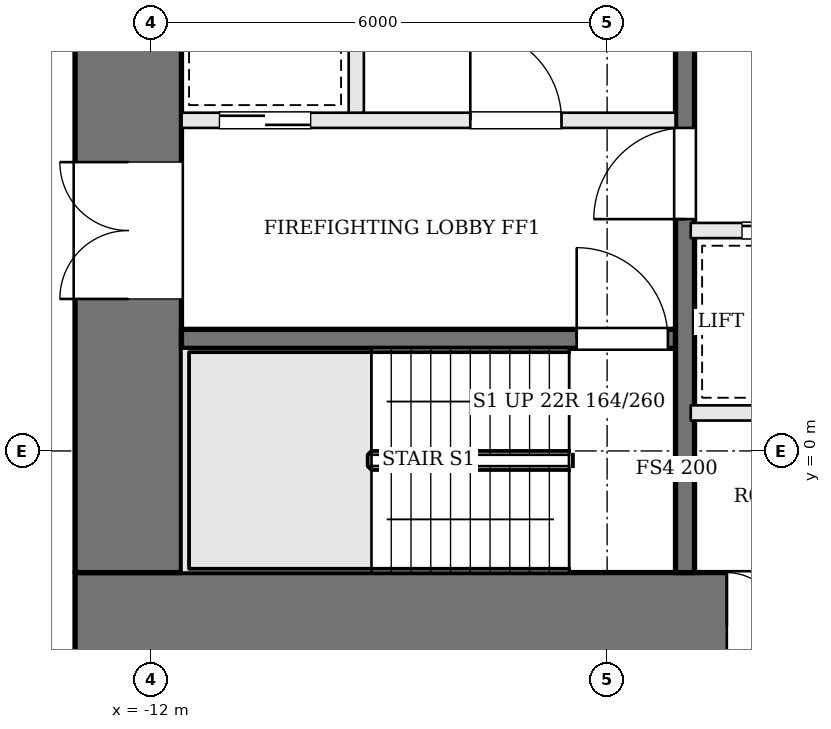
"""IFC4 building model, lengths in metres.
Left out: names, types, materials, properties, quantities, classifications, styles, units other than length and angle.
Written with IfcOpenShell. Run it as: python <this file> out.ifc"""

import sys

from ifc_helpers import new_model, si_unit, direction, frame, frame_2d, origin, place, context, subcontext, project, spatial, rectangle, extrude, element, fill, save


model = new_model("IFC4")
c1 = context("Model", 3, precision=1e-05, world=origin(), true_north=direction((0.0, 1.0)))
c2 = subcontext(c1, "Body", "Model", "MODEL_VIEW")
j1 = project(units=[si_unit("LENGTHUNIT", "METRE"), si_unit("PLANEANGLEUNIT", "RADIAN")], contexts=[c1])
p1 = place(None, origin())
s1 = spatial("IfcSite", under=j1, at=p1, CompositionType="ELEMENT")
p2 = place(p1, origin())
s2 = spatial("IfcBuilding", under=s1, at=p2, CompositionType="ELEMENT")
p3 = place(p2, frame((0.0, 0.0, 51.9)))
s3 = spatial("IfcBuildingStorey", under=s2, at=p3, CompositionType="ELEMENT", Elevation=51.9)
p4 = place(p3, frame((-13.0, -2.3, 0.0), z_axis=(0.0, 0.0, 1.0), x_axis=(1.0, 0.0, 0.0)))
e1 = element("IfcWall", 1, at=p4, inside=s3, PredefinedType="SHEAR", context=c2, shape_type="SweptSolid", body=[
    extrude(rectangle(XDim=26.0, YDim=1.4, at=frame_2d((13.0, 0.0))), origin(), (0.0, 0.0, 1.0), 3.6),
])
p5 = place(p4, frame((8.575, 0.0, 0.0)))
e2 = element("IfcOpeningElement", 2, at=p5, cuts=e1, PredefinedType="OPENING", context=c2, shape_type="SweptSolid", body=[
    extrude(rectangle(XDim=0.7, YDim=2.1, at=frame_2d((0.35, 1.05))), frame((0.0, 0.71, 0.0), z_axis=(0.0, -1.0, 0.0), x_axis=(1.0, 0.0, 0.0)), (0.0, 0.0, 1.0), 1.42),
])
p6 = place(p4, frame((10.475, 0.0, 0.0)))
e3 = element("IfcOpeningElement", 3, at=p6, cuts=e1, PredefinedType="OPENING", context=c2, shape_type="SweptSolid", body=[
    extrude(rectangle(XDim=1.0, YDim=2.1, at=frame_2d((0.5, 1.05))), frame((0.0, 0.71, 0.0), z_axis=(0.0, -1.0, 0.0), x_axis=(1.0, 0.0, 0.0)), (0.0, 0.0, 1.0), 1.42),
])
p7 = place(p4, frame((13.325, 0.0, 0.0)))
e4 = element("IfcOpeningElement", 4, at=p7, cuts=e1, PredefinedType="OPENING", context=c2, shape_type="SweptSolid", body=[
    extrude(rectangle(XDim=1.0, YDim=2.1, at=frame_2d((0.5, 1.05))), frame((0.0, 0.71, 0.0), z_axis=(0.0, -1.0, 0.0), x_axis=(1.0, 0.0, 0.0)), (0.0, 0.0, 1.0), 1.42),
])
p8 = place(p4, frame((16.175, 0.0, 0.0)))
e5 = element("IfcOpeningElement", 5, at=p8, cuts=e1, PredefinedType="OPENING", context=c2, shape_type="SweptSolid", body=[
    extrude(rectangle(XDim=1.0, YDim=2.1, at=frame_2d((0.5, 1.05))), frame((0.0, 0.71, 0.0), z_axis=(0.0, -1.0, 0.0), x_axis=(1.0, 0.0, 0.0)), (0.0, 0.0, 1.0), 1.42),
])
p9 = place(p3, frame((-12.3, -1.6, 0.0), z_axis=(0.0, 0.0, 1.0), x_axis=(0.0, 1.0, 0.0)))
e6 = element("IfcWall", 6, at=p9, inside=s3, PredefinedType="SHEAR", context=c2, shape_type="SweptSolid", body=[
    extrude(rectangle(XDim=12.2, YDim=1.4, at=frame_2d((6.1, 0.0))), origin(), (0.0, 0.0, 1.0), 3.6),
])
p10 = place(p9, frame((3.6, 0.0, 0.0)))
e7 = element("IfcOpeningElement", 7, at=p10, cuts=e6, PredefinedType="OPENING", context=c2, shape_type="SweptSolid", body=[
    extrude(rectangle(XDim=1.8, YDim=2.1, at=frame_2d((0.9, 1.05))), frame((0.0, 0.71, 0.0), z_axis=(0.0, -1.0, 0.0), x_axis=(1.0, 0.0, 0.0)), (0.0, 0.0, 1.0), 1.42),
])
p11 = place(p3, frame((-11.6, 1.475, 0.0), z_axis=(0.0, 0.0, 1.0), x_axis=(1.0, 0.0, 0.0)))
e8 = element("IfcWall", 8, at=p11, inside=s3, PredefinedType="SOLIDWALL", context=c2, shape_type="SweptSolid", body=[
    extrude(rectangle(XDim=6.5, YDim=0.25, at=frame_2d((3.25, 0.0))), origin(), (0.0, 0.0, 1.0), 3.4),
])
p12 = place(p11, frame((5.2, 0.0, 0.0)))
e9 = element("IfcOpeningElement", 9, at=p12, cuts=e8, PredefinedType="OPENING", context=c2, shape_type="SweptSolid", body=[
    extrude(rectangle(XDim=1.2, YDim=2.1, at=frame_2d((0.6, 1.05))), frame((0.0, 0.135, 0.0), z_axis=(0.0, -1.0, 0.0), x_axis=(1.0, 0.0, 0.0)), (0.0, 0.0, 1.0), 0.27),
])
p13 = place(p3, frame((-11.6, 4.35, 0.0), z_axis=(0.0, 0.0, 1.0), x_axis=(1.0, 0.0, 0.0)))
e10 = element("IfcWall", 10, at=p13, inside=s3, PredefinedType="SOLIDWALL", context=c2, shape_type="SweptSolid", body=[
    extrude(rectangle(XDim=6.5, YDim=0.2, at=frame_2d((3.25, 0.0))), origin(), (0.0, 0.0, 1.0), 3.4),
])
p14 = place(p13, frame((3.8, 0.0, 0.0)))
e11 = element("IfcOpeningElement", 11, at=p14, cuts=e10, PredefinedType="OPENING", context=c2, shape_type="SweptSolid", body=[
    extrude(rectangle(XDim=1.2, YDim=2.1, at=frame_2d((0.6, 1.05))), frame((0.0, 0.11, 0.0), z_axis=(0.0, -1.0, 0.0), x_axis=(1.0, 0.0, 0.0)), (0.0, 0.0, 1.0), 0.22),
])
p15 = place(p13, frame((0.5, 0.0, 0.0)))
e12 = element("IfcOpeningElement", 12, at=p15, cuts=e10, PredefinedType="OPENING", context=c2, shape_type="SweptSolid", body=[
    extrude(rectangle(XDim=1.2, YDim=2.1, at=frame_2d((0.6, 1.05))), frame((0.0, 0.11, 0.0), z_axis=(0.0, -1.0, 0.0), x_axis=(1.0, 0.0, 0.0)), (0.0, 0.0, 1.0), 0.22),
])
p16 = place(p3, frame((-9.3, 4.45, 0.0), z_axis=(0.0, 0.0, 1.0), x_axis=(0.0, 1.0, 0.0)))
e13 = element("IfcWall", 13, at=p16, inside=s3, PredefinedType="SOLIDWALL", context=c2, shape_type="SweptSolid", body=[
    extrude(rectangle(XDim=3.0, YDim=0.2, at=frame_2d((1.5, 0.0))), origin(), (0.0, 0.0, 1.0), 3.4),
])
p17 = place(p3, frame((-4.975, -1.6, 0.0), z_axis=(0.0, 0.0, 1.0), x_axis=(0.0, 1.0, 0.0)))
e14 = element("IfcWall", 14, at=p17, inside=s3, PredefinedType="SOLIDWALL", context=c2, shape_type="SweptSolid", body=[
    extrude(rectangle(XDim=12.2, YDim=0.25, at=frame_2d((6.1, 0.0))), origin(), (0.0, 0.0, 1.0), 3.4),
])
p18 = place(p17, frame((4.65, 0.0, 0.0)))
e15 = element("IfcOpeningElement", 15, at=p18, cuts=e14, PredefinedType="OPENING", context=c2, shape_type="SweptSolid", body=[
    extrude(rectangle(XDim=1.2, YDim=2.1, at=frame_2d((0.6, 1.05))), frame((0.0, 0.135, 0.0), z_axis=(0.0, -1.0, 0.0), x_axis=(1.0, 0.0, 0.0)), (0.0, 0.0, 1.0), 0.27),
])
p19 = place(p3, frame((-4.9, 0.5, 0.0), z_axis=(0.0, 0.0, 1.0), x_axis=(1.0, 0.0, 0.0)))
e16 = element("IfcWall", 16, at=p19, inside=s3, PredefinedType="SOLIDWALL", context=c2, shape_type="SweptSolid", body=[
    extrude(rectangle(XDim=9.8, YDim=0.2, at=frame_2d((4.9, 0.0))), origin(), (0.0, 0.0, 1.0), 3.4),
])
p20 = place(p3, frame((-4.9, 2.9, 0.0), z_axis=(0.0, 0.0, 1.0), x_axis=(1.0, 0.0, 0.0)))
e17 = element("IfcWall", 17, at=p20, inside=s3, PredefinedType="SOLIDWALL", context=c2, shape_type="SweptSolid", body=[
    extrude(rectangle(XDim=9.8, YDim=0.2, at=frame_2d((4.9, 0.0))), origin(), (0.0, 0.0, 1.0), 3.4),
])
p21 = place(p20, frame((0.675, 0.0, 0.0)))
e18 = element("IfcOpeningElement", 18, at=p21, cuts=e17, PredefinedType="OPENING", context=c2, shape_type="SweptSolid", body=[
    extrude(rectangle(XDim=1.1, YDim=2.1, at=frame_2d((0.55, 1.05))), frame((0.0, 0.11, 0.0), z_axis=(0.0, -1.0, 0.0), x_axis=(1.0, 0.0, 0.0)), (0.0, 0.0, 1.0), 0.22),
])
p22 = place(p20, frame((3.125, 0.0, 0.0)))
e19 = element("IfcOpeningElement", 19, at=p22, cuts=e17, PredefinedType="OPENING", context=c2, shape_type="SweptSolid", body=[
    extrude(rectangle(XDim=1.1, YDim=2.1, at=frame_2d((0.55, 1.05))), frame((0.0, 0.11, 0.0), z_axis=(0.0, -1.0, 0.0), x_axis=(1.0, 0.0, 0.0)), (0.0, 0.0, 1.0), 0.22),
])
p23 = place(p10, origin())
e20 = element("IfcDoor", 20, at=p23, inside=s3, OperationType="DOUBLE_DOOR_SINGLE_SWING", PredefinedType="DOOR", context=c2, shape_type="SweptSolid", body=[
    extrude(rectangle(XDim=1.8, YDim=2.1, at=frame_2d((0.9, 1.05))), frame((0.0, 0.025, 0.0), z_axis=(0.0, -1.0, 0.0), x_axis=(1.0, 0.0, 0.0)), (0.0, 0.0, 1.0), 0.05),
])
fill(e7, e20)
p24 = place(p18, origin())
e21 = element("IfcDoor", 21, at=p24, inside=s3, OperationType="SINGLE_SWING_LEFT", PredefinedType="DOOR", context=c2, shape_type="SweptSolid", body=[
    extrude(rectangle(XDim=1.2, YDim=2.1, at=frame_2d((0.6, 1.05))), frame((0.0, 0.025, 0.0), z_axis=(0.0, -1.0, 0.0), x_axis=(1.0, 0.0, 0.0)), (0.0, 0.0, 1.0), 0.05),
])
fill(e15, e21)
p25 = place(p14, origin())
e22 = element("IfcDoor", 22, at=p25, inside=s3, OperationType="SINGLE_SWING_LEFT", PredefinedType="DOOR", context=c2, shape_type="SweptSolid", body=[
    extrude(rectangle(XDim=1.2, YDim=2.1, at=frame_2d((0.6, 1.05))), frame((0.0, 0.025, 0.0), z_axis=(0.0, -1.0, 0.0), x_axis=(1.0, 0.0, 0.0)), (0.0, 0.0, 1.0), 0.05),
])
fill(e11, e22)
p26 = place(p12, origin())
e23 = element("IfcDoor", 23, at=p26, inside=s3, OperationType="SINGLE_SWING_LEFT", PredefinedType="DOOR", context=c2, shape_type="SweptSolid", body=[
    extrude(rectangle(XDim=1.2, YDim=2.1, at=frame_2d((0.6, 1.05))), frame((0.0, 0.025, 0.0), z_axis=(0.0, -1.0, 0.0), x_axis=(1.0, 0.0, 0.0)), (0.0, 0.0, 1.0), 0.05),
])
fill(e9, e23)
p27 = place(p15, origin())
e24 = element("IfcDoor", 24, at=p27, inside=s3, OperationType="SLIDING_TO_RIGHT", PredefinedType="DOOR", context=c2, shape_type="SweptSolid", body=[
    extrude(rectangle(XDim=1.2, YDim=2.1, at=frame_2d((0.6, 1.05))), frame((0.0, 0.025, 0.0), z_axis=(0.0, -1.0, 0.0), x_axis=(1.0, 0.0, 0.0)), (0.0, 0.0, 1.0), 0.05),
])
fill(e12, e24)
p28 = place(p21, origin())
e25 = element("IfcDoor", 25, at=p28, inside=s3, OperationType="SLIDING_TO_RIGHT", PredefinedType="DOOR", context=c2, shape_type="SweptSolid", body=[
    extrude(rectangle(XDim=1.1, YDim=2.1, at=frame_2d((0.55, 1.05))), frame((0.0, 0.025, 0.0), z_axis=(0.0, -1.0, 0.0), x_axis=(1.0, 0.0, 0.0)), (0.0, 0.0, 1.0), 0.05),
])
fill(e18, e25)
p29 = place(p5, origin())
e26 = element("IfcDoor", 26, at=p29, inside=s3, OperationType="SINGLE_SWING_LEFT", PredefinedType="DOOR", context=c2, shape_type="SweptSolid", body=[
    extrude(rectangle(XDim=0.7, YDim=2.1, at=frame_2d((0.35, 1.05))), frame((0.0, 0.025, 0.0), z_axis=(0.0, -1.0, 0.0), x_axis=(1.0, 0.0, 0.0)), (0.0, 0.0, 1.0), 0.05),
])
fill(e2, e26)
save(model, sys.argv[1])
